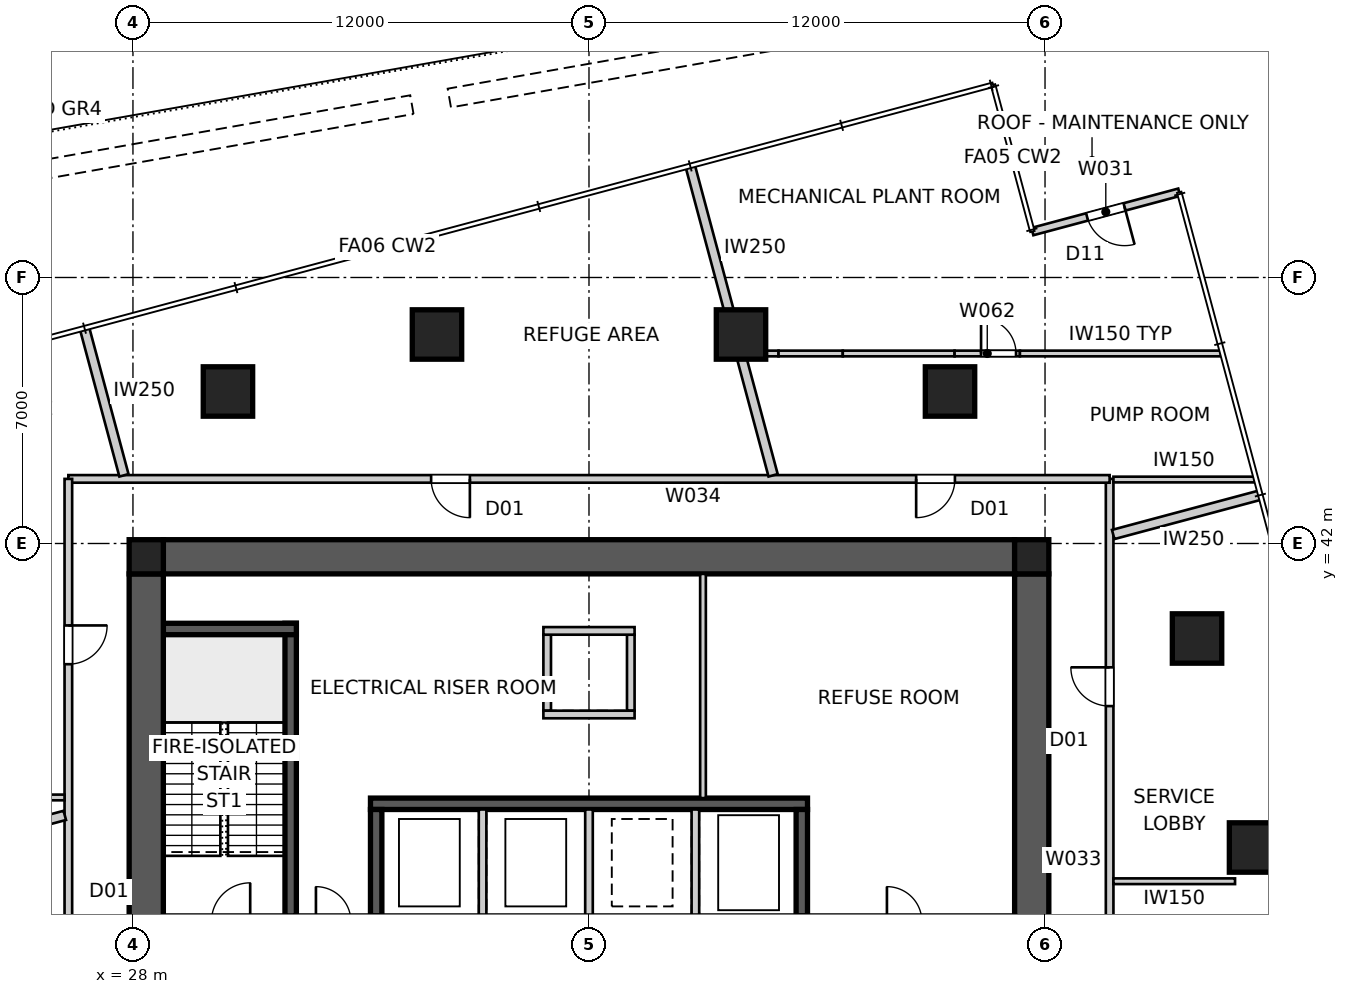
"""IFC4 building model, lengths in metres.
Left out: names, types, materials, properties, quantities, classifications, styles, units other than length and angle.
Written with IfcOpenShell. Run it as: python <this file> out.ifc"""

import sys

from ifc_helpers import new_model, si_unit, direction, frame, frame_2d, origin, origin_2d, place, context, subcontext, project, spatial, polyline, rectangle, outline, extrude, element, fill, save


model = new_model("IFC4")
c1 = context("Model", 3, precision=1e-05, world=origin(), true_north=direction((0.0, 1.0)))
c2 = subcontext(c1, "Body", "Model", "MODEL_VIEW")
j1 = project(units=[si_unit("LENGTHUNIT", "METRE"), si_unit("PLANEANGLEUNIT", "RADIAN")], contexts=[c1])
p1 = place(None, origin())
s1 = spatial("IfcSite", under=j1, at=p1, CompositionType="ELEMENT")
p2 = place(p1, origin())
s2 = spatial("IfcBuilding", under=s1, at=p2, CompositionType="ELEMENT")
p3 = place(p2, frame((0.0, 0.0, 106.6)))
s3 = spatial("IfcBuildingStorey", under=s2, at=p3, CompositionType="ELEMENT", Elevation=106.6)
p4 = place(p3, frame((28.8, 41.65, 0.0), z_axis=(0.0, 0.0, 1.0), x_axis=(1.0, 0.0, 0.0)))
e1 = element("IfcWall", 1, at=p4, inside=s3, PredefinedType="SHEAR", context=c2, shape_type="SweptSolid", body=[
    extrude(outline(polyline([(0.0, -0.45), (22.4, -0.45), (22.4, -0.025), (22.85, -0.025), (22.85, 0.025), (22.4, 0.025), (22.4, 0.45), (0.0, 0.45), (0.0, 0.025), (-0.45, 0.025), (-0.45, -0.025), (0.0, -0.025), (0.0, -0.45)])), origin(), (0.0, 0.0, 1.0), 5.0),
])
p5 = place(p3, frame((51.65, 18.8, 0.0), z_axis=(0.0, 0.0, 1.0), x_axis=(0.0, 1.0, 0.0)))
e2 = element("IfcWall", 2, at=p5, inside=s3, PredefinedType="SHEAR", context=c2, shape_type="SweptSolid", body=[
    extrude(outline(polyline([(0.0, -0.45), (22.4, -0.45), (22.4, -0.025), (22.85, -0.025), (22.85, 0.025), (22.4, 0.025), (22.4, 0.45), (0.0, 0.45), (0.0, 0.025), (-0.45, 0.025), (-0.45, -0.025), (0.0, -0.025), (0.0, -0.45)])), origin(), (0.0, 0.0, 1.0), 5.0),
])
p6 = place(p5, frame((11.14, 0.0, 0.0)))
e3 = element("IfcOpeningElement", 3, at=p6, cuts=e2, PredefinedType="OPENING", context=c2, shape_type="SweptSolid", body=[
    extrude(rectangle(XDim=1.02, YDim=2.4, at=frame_2d((0.51, 1.2))), frame((0.0, 0.46, 0.0), z_axis=(0.0, -1.0, 0.0), x_axis=(1.0, 0.0, 0.0)), (0.0, 0.0, 1.0), 0.92),
])
p7 = place(p3, frame((28.35, 41.2, 0.0), z_axis=(0.0, 0.0, 1.0), x_axis=(0.0, -1.0, 0.0)))
e4 = element("IfcWall", 4, at=p7, inside=s3, PredefinedType="SHEAR", context=c2, shape_type="SweptSolid", body=[
    extrude(outline(polyline([(0.0, -0.45), (22.4, -0.45), (22.4, -0.025), (22.85, -0.025), (22.85, 0.025), (22.4, 0.025), (22.4, 0.45), (0.0, 0.45), (0.0, 0.025), (-0.45, 0.025), (-0.45, -0.025), (0.0, -0.025), (0.0, -0.45)])), origin(), (0.0, 0.0, 1.0), 5.0),
])
p8 = place(p7, frame((11.14, 0.0, 0.0)))
e5 = element("IfcOpeningElement", 5, at=p8, cuts=e4, PredefinedType="OPENING", context=c2, shape_type="SweptSolid", body=[
    extrude(rectangle(XDim=1.02, YDim=2.4, at=frame_2d((0.51, 1.2))), frame((0.0, 0.46, 0.0), z_axis=(0.0, -1.0, 0.0), x_axis=(1.0, 0.0, 0.0)), (0.0, 0.0, 1.0), 0.92),
])
p9 = place(p3, frame((34.25, 35.15, 0.0), z_axis=(0.0, 0.0, 1.0), x_axis=(1.0, 0.0, 0.0)))
e6 = element("IfcWall", 6, at=p9, inside=s3, PredefinedType="SHEAR", context=c2, shape_type="SweptSolid", body=[
    extrude(rectangle(XDim=11.5, YDim=0.3, at=frame_2d((5.75, 0.0))), origin(), (0.0, 0.0, 1.0), 5.0),
])
p10 = place(p3, frame((34.4, 32.2, 0.0), z_axis=(0.0, 0.0, 1.0), x_axis=(0.0, 1.0, 0.0)))
e7 = element("IfcWall", 7, at=p10, inside=s3, PredefinedType="SHEAR", context=c2, shape_type="SweptSolid", body=[
    extrude(rectangle(XDim=2.8, YDim=0.3, at=frame_2d((1.4, 0.0))), origin(), (0.0, 0.0, 1.0), 5.0),
])
for number, where, z_axis, x_axis in (
    (8, (37.2, 32.2, 0.0), (0.0, 0.0, 1.0), (0.0, 1.0, 0.0)),
    (9, (40.0, 32.2, 0.0), (0.0, 0.0, 1.0), (0.0, 1.0, 0.0)),
    (10, (42.8, 32.2, 0.0), (0.0, 0.0, 1.0), (0.0, 1.0, 0.0)),
):
    element("IfcWall", number, at=place(p3, frame(where, z_axis=z_axis, x_axis=x_axis)), inside=s3, PredefinedType="SOLIDWALL", context=c2, shape_type="SweptSolid", body=[
        extrude(rectangle(XDim=2.8, YDim=0.2, at=frame_2d((1.4, 0.0))), origin(), (0.0, 0.0, 1.0), 5.0),
    ])
p11 = place(p3, frame((45.6, 32.2, 0.0), z_axis=(0.0, 0.0, 1.0), x_axis=(0.0, 1.0, 0.0)))
e11 = element("IfcWall", 11, at=p11, inside=s3, PredefinedType="SHEAR", context=c2, shape_type="SweptSolid", body=[
    extrude(rectangle(XDim=2.8, YDim=0.3, at=frame_2d((1.4, 0.0))), origin(), (0.0, 0.0, 1.0), 5.0),
])
p12 = place(p3, frame((32.15, 32.2, 0.0), z_axis=(0.0, 0.0, 1.0), x_axis=(0.0, 1.0, 0.0)))
e12 = element("IfcWall", 12, at=p12, inside=s3, PredefinedType="SHEAR", context=c2, shape_type="SweptSolid", body=[
    extrude(rectangle(XDim=7.7, YDim=0.3, at=frame_2d((3.85, 0.0))), origin(), (0.0, 0.0, 1.0), 5.0),
])
p13 = place(p3, frame((28.8, 39.75, 0.0), z_axis=(0.0, 0.0, 1.0), x_axis=(1.0, 0.0, 0.0)))
e13 = element("IfcWall", 13, at=p13, inside=s3, PredefinedType="SHEAR", context=c2, shape_type="SweptSolid", body=[
    extrude(rectangle(XDim=3.5, YDim=0.3, at=frame_2d((1.75, 0.0))), origin(), (0.0, 0.0, 1.0), 5.0),
])
for number, where, z_axis, x_axis in (
    (14, (38.9, 37.6, 0.0), (0.0, 0.0, 1.0), (0.0, 1.0, 0.0)),
    (15, (41.1, 37.6, 0.0), (0.0, 0.0, 1.0), (0.0, 1.0, 0.0)),
):
    element("IfcWall", number, at=place(p3, frame(where, z_axis=z_axis, x_axis=x_axis)), inside=s3, PredefinedType="SOLIDWALL", context=c2, shape_type="SweptSolid", body=[
        extrude(rectangle(XDim=2.0, YDim=0.2, at=frame_2d((1.0, 0.0))), origin(), (0.0, 0.0, 1.0), 5.0),
    ])
for number, where, z_axis, x_axis in (
    (16, (38.8, 37.5, 0.0), (0.0, 0.0, 1.0), (1.0, 0.0, 0.0)),
    (17, (38.8, 39.7, 0.0), (0.0, 0.0, 1.0), (1.0, 0.0, 0.0)),
):
    element("IfcWall", number, at=place(p3, frame(where, z_axis=z_axis, x_axis=x_axis)), inside=s3, PredefinedType="SOLIDWALL", context=c2, shape_type="SweptSolid", body=[
        extrude(rectangle(XDim=2.4, YDim=0.2, at=frame_2d((1.2, 0.0))), origin(), (0.0, 0.0, 1.0), 5.0),
    ])
for number, where, z_axis, x_axis in (
    (18, (51.65, 41.65, 0.0), (0.0, 0.0, 1.0), (1.0, 0.0, 0.0)),
    (19, (28.35, 41.65, 0.0), (0.0, 0.0, 1.0), (1.0, 0.0, 0.0)),
):
    element("IfcColumn", number, at=place(p3, frame(where, z_axis=z_axis, x_axis=x_axis)), inside=s3, PredefinedType="COLUMN", context=c2, shape_type="SweptSolid", body=[
        extrude(rectangle(XDim=0.9, YDim=0.9, at=origin_2d()), origin(), (0.0, 0.0, 1.0), 5.0),
    ])
for number, where, z_axis, x_axis in (
    (20, (57.5, 34.0, 0.0), (0.0, 0.0, 1.0), (1.0, 0.0, 0.0)),
    (21, (56.0, 39.5, 0.0), (0.0, 0.0, 1.0), (1.0, 0.0, 0.0)),
    (22, (49.5, 46.0, 0.0), (0.0, 0.0, 1.0), (1.0, 0.0, 0.0)),
    (23, (44.0, 47.5, 0.0), (0.0, 0.0, 1.0), (1.0, 0.0, 0.0)),
    (24, (36.0, 47.5, 0.0), (0.0, 0.0, 1.0), (1.0, 0.0, 0.0)),
    (25, (30.5, 46.0, 0.0), (0.0, 0.0, 1.0), (1.0, 0.0, 0.0)),
):
    element("IfcColumn", number, at=place(p3, frame(where, z_axis=z_axis, x_axis=x_axis)), inside=s3, PredefinedType="COLUMN", context=c2, shape_type="SweptSolid", body=[
        extrude(rectangle(XDim=1.3, YDim=1.3, at=origin_2d()), origin(), (0.0, 0.0, 1.0), 5.0),
    ])
p14 = place(p3, frame((55.531, 51.244, 0.0), z_axis=(0.0, 0.0, 1.0), x_axis=(-0.965919172068, -0.258843877716, 0.0)))
e26 = element("IfcWall", 26, at=p14, inside=s3, PredefinedType="SOLIDWALL", context=c2, shape_type="SweptSolid", body=[
    extrude(rectangle(XDim=4.0, YDim=0.2, at=frame_2d((2.0, 0.0))), origin(), (0.0, 0.0, 1.0), 4.85),
])
p15 = place(p14, frame((1.49, 0.0, 0.0)))
e27 = element("IfcOpeningElement", 27, at=p15, cuts=e26, PredefinedType="OPENING", context=c2, shape_type="SweptSolid", body=[
    extrude(rectangle(XDim=1.02, YDim=2.1, at=frame_2d((0.51, 1.05))), frame((0.0, 0.11, 0.0), z_axis=(0.0, -1.0, 0.0), x_axis=(1.0, 0.0, 0.0)), (0.0, 0.0, 1.0), 0.22),
])
p16 = place(p3, frame((53.7, 16.3, 0.0), z_axis=(0.0, 0.0, 1.0), x_axis=(0.0, 1.0, 0.0)))
e28 = element("IfcWall", 28, at=p16, inside=s3, PredefinedType="PARTITIONING", context=c2, shape_type="SweptSolid", body=[
    extrude(rectangle(XDim=27.4, YDim=0.2, at=frame_2d((13.7, 0.0))), origin(), (0.0, 0.0, 1.0), 4.85),
])
p17 = place(p16, frame((21.421, 0.0, 0.0)))
e29 = element("IfcOpeningElement", 29, at=p17, cuts=e28, PredefinedType="OPENING", context=c2, shape_type="SweptSolid", body=[
    extrude(rectangle(XDim=1.02, YDim=2.34, at=frame_2d((0.51, 1.17))), frame((0.0, 0.11, 0.0), z_axis=(0.0, -1.0, 0.0), x_axis=(1.0, 0.0, 0.0)), (0.0, 0.0, 1.0), 0.22),
])
p18 = place(p16, frame((12.293, 0.0, 0.0)))
e30 = element("IfcOpeningElement", 30, at=p18, cuts=e28, PredefinedType="OPENING", context=c2, shape_type="SweptSolid", body=[
    extrude(rectangle(XDim=1.02, YDim=2.34, at=frame_2d((0.51, 1.17))), frame((0.0, 0.11, 0.0), z_axis=(0.0, -1.0, 0.0), x_axis=(1.0, 0.0, 0.0)), (0.0, 0.0, 1.0), 0.22),
])
p19 = place(p16, frame((4.133, 0.0, 0.0)))
e31 = element("IfcOpeningElement", 31, at=p19, cuts=e28, PredefinedType="OPENING", context=c2, shape_type="SweptSolid", body=[
    extrude(rectangle(XDim=1.02, YDim=2.34, at=frame_2d((0.51, 1.17))), frame((0.0, 0.11, 0.0), z_axis=(0.0, -1.0, 0.0), x_axis=(1.0, 0.0, 0.0)), (0.0, 0.0, 1.0), 0.22),
])
p20 = place(p16, frame((0.862, 0.0, 0.0)))
e32 = element("IfcOpeningElement", 32, at=p20, cuts=e28, PredefinedType="OPENING", context=c2, shape_type="SweptSolid", body=[
    extrude(rectangle(XDim=1.02, YDim=2.34, at=frame_2d((0.51, 1.17))), frame((0.0, 0.11, 0.0), z_axis=(0.0, -1.0, 0.0), x_axis=(1.0, 0.0, 0.0)), (0.0, 0.0, 1.0), 0.22),
])
p21 = place(p16, frame((7.342, 0.0, 0.0)))
e33 = element("IfcOpeningElement", 33, at=p21, cuts=e28, PredefinedType="OPENING", context=c2, shape_type="SweptSolid", body=[
    extrude(rectangle(XDim=1.02, YDim=2.34, at=frame_2d((0.51, 1.17))), frame((0.0, 0.11, 0.0), z_axis=(0.0, -1.0, 0.0), x_axis=(1.0, 0.0, 0.0)), (0.0, 0.0, 1.0), 0.22),
])
p22 = place(p3, frame((53.7, 43.7, 0.0), z_axis=(0.0, 0.0, 1.0), x_axis=(-1.0, 0.0, 0.0)))
e34 = element("IfcWall", 34, at=p22, inside=s3, PredefinedType="PARTITIONING", context=c2, shape_type="SweptSolid", body=[
    extrude(rectangle(XDim=27.4, YDim=0.2, at=frame_2d((13.7, 0.0))), origin(), (0.0, 0.0, 1.0), 4.85),
])
p23 = place(p22, frame((16.834, 0.0, 0.0)))
e35 = element("IfcOpeningElement", 35, at=p23, cuts=e34, PredefinedType="OPENING", context=c2, shape_type="SweptSolid", body=[
    extrude(rectangle(XDim=1.02, YDim=2.34, at=frame_2d((0.51, 1.17))), frame((0.0, 0.11, 0.0), z_axis=(0.0, -1.0, 0.0), x_axis=(1.0, 0.0, 0.0)), (0.0, 0.0, 1.0), 0.22),
])
p24 = place(p22, frame((4.071, 0.0, 0.0)))
e36 = element("IfcOpeningElement", 36, at=p24, cuts=e34, PredefinedType="OPENING", context=c2, shape_type="SweptSolid", body=[
    extrude(rectangle(XDim=1.02, YDim=2.34, at=frame_2d((0.51, 1.17))), frame((0.0, 0.11, 0.0), z_axis=(0.0, -1.0, 0.0), x_axis=(1.0, 0.0, 0.0)), (0.0, 0.0, 1.0), 0.22),
])
p25 = place(p3, frame((26.3, 43.7, 0.0), z_axis=(0.0, 0.0, 1.0), x_axis=(0.0, -1.0, 0.0)))
e37 = element("IfcWall", 37, at=p25, inside=s3, PredefinedType="PARTITIONING", context=c2, shape_type="SweptSolid", body=[
    extrude(rectangle(XDim=27.4, YDim=0.2, at=frame_2d((13.7, 0.0))), origin(), (0.0, 0.0, 1.0), 4.85),
])
p26 = place(p25, frame((20.535, 0.0, 0.0)))
e38 = element("IfcOpeningElement", 38, at=p26, cuts=e37, PredefinedType="OPENING", context=c2, shape_type="SweptSolid", body=[
    extrude(rectangle(XDim=1.02, YDim=2.34, at=frame_2d((0.51, 1.17))), frame((0.0, 0.11, 0.0), z_axis=(0.0, -1.0, 0.0), x_axis=(1.0, 0.0, 0.0)), (0.0, 0.0, 1.0), 0.22),
])
p27 = place(p25, frame((3.856, 0.0, 0.0)))
e39 = element("IfcOpeningElement", 39, at=p27, cuts=e37, PredefinedType="OPENING", context=c2, shape_type="SweptSolid", body=[
    extrude(rectangle(XDim=1.02, YDim=2.34, at=frame_2d((0.51, 1.17))), frame((0.0, 0.11, 0.0), z_axis=(0.0, -1.0, 0.0), x_axis=(1.0, 0.0, 0.0)), (0.0, 0.0, 1.0), 0.22),
])
p28 = place(p25, frame((11.779, 0.0, 0.0)))
e40 = element("IfcOpeningElement", 40, at=p28, cuts=e37, PredefinedType="OPENING", context=c2, shape_type="SweptSolid", body=[
    extrude(rectangle(XDim=1.02, YDim=2.34, at=frame_2d((0.51, 1.17))), frame((0.0, 0.11, 0.0), z_axis=(0.0, -1.0, 0.0), x_axis=(1.0, 0.0, 0.0)), (0.0, 0.0, 1.0), 0.22),
])
p29 = place(p3, frame((57.666, 43.275, 0.0), z_axis=(0.0, 0.0, 1.0), x_axis=(-0.96592902462, -0.258807108475, 0.0)))
e41 = element("IfcWall", 41, at=p29, inside=s3, PredefinedType="PARTITIONING", context=c2, shape_type="SweptSolid", body=[
    extrude(rectangle(XDim=4.009, YDim=0.25, at=frame_2d((2.004, 0.0))), origin(), (0.0, 0.0, 1.0), 4.85),
])
p30 = place(p3, frame((42.663, 51.937, 0.0), z_axis=(0.0, 0.0, 1.0), x_axis=(0.25881425273, -0.965927110389, 0.0)))
e42 = element("IfcWall", 42, at=p30, inside=s3, PredefinedType="PARTITIONING", context=c2, shape_type="SweptSolid", body=[
    extrude(rectangle(XDim=8.43, YDim=0.25, at=frame_2d((4.215, 0.0))), origin(), (0.0, 0.0, 1.0), 4.85),
])
p31 = place(p3, frame((26.725, 47.666, 0.0), z_axis=(0.0, 0.0, 1.0), x_axis=(0.258807108475, -0.96592902462, 0.0)))
e43 = element("IfcWall", 43, at=p31, inside=s3, PredefinedType="PARTITIONING", context=c2, shape_type="SweptSolid", body=[
    extrude(rectangle(XDim=4.009, YDim=0.25, at=frame_2d((2.004, 0.0))), origin(), (0.0, 0.0, 1.0), 4.85),
])
p32 = place(p3, frame((18.063, 32.663, 0.0), z_axis=(0.0, 0.0, 1.0), x_axis=(0.965927110389, 0.25881425273, 0.0)))
e44 = element("IfcWall", 44, at=p32, inside=s3, PredefinedType="PARTITIONING", context=c2, shape_type="SweptSolid", body=[
    extrude(rectangle(XDim=8.43, YDim=0.25, at=frame_2d((4.215, 0.0))), origin(), (0.0, 0.0, 1.0), 4.85),
])
p33 = place(p3, frame((43.0, 41.2, 0.0), z_axis=(0.0, 0.0, 1.0), x_axis=(0.0, -1.0, 0.0)))
e45 = element("IfcWall", 45, at=p33, inside=s3, PredefinedType="SOLIDWALL", context=c2, shape_type="SweptSolid", body=[
    extrude(rectangle(XDim=5.9, YDim=0.15, at=frame_2d((2.95, 0.0))), origin(), (0.0, 0.0, 1.0), 4.85),
])
p34 = place(p3, frame((53.8, 43.683, 0.0), z_axis=(0.0, 0.0, 1.0), x_axis=(1.0, 0.0, 0.0)))
e46 = element("IfcWall", 46, at=p34, inside=s3, PredefinedType="SOLIDWALL", context=c2, shape_type="SweptSolid", body=[
    extrude(rectangle(XDim=3.717, YDim=0.15, at=frame_2d((1.858, 0.0))), origin(), (0.0, 0.0, 1.0), 4.85),
])
p35 = place(p3, frame((57.0, 33.112, 0.0), z_axis=(0.0, 0.0, 1.0), x_axis=(-1.0, 0.0, 0.0)))
e47 = element("IfcWall", 47, at=p35, inside=s3, PredefinedType="SOLIDWALL", context=c2, shape_type="SweptSolid", body=[
    extrude(rectangle(XDim=3.2, YDim=0.15, at=frame_2d((1.6, 0.0))), origin(), (0.0, 0.0, 1.0), 4.85),
])
p36 = place(p3, frame((43.986, 47.0, 0.0), z_axis=(0.0, 0.0, 1.0), x_axis=(1.0, 0.0, 0.0)))
e48 = element("IfcWall", 48, at=p36, inside=s3, PredefinedType="SOLIDWALL", context=c2, shape_type="SweptSolid", body=[
    extrude(rectangle(XDim=1.002, YDim=0.15, at=frame_2d((0.501, 0.0))), origin(), (0.0, 0.0, 1.0), 4.85),
])
p37 = place(p3, frame((44.988, 47.0, 0.0), z_axis=(0.0, 0.0, 1.0), x_axis=(1.0, 0.0, 0.0)))
e49 = element("IfcWall", 49, at=p37, inside=s3, PredefinedType="SOLIDWALL", context=c2, shape_type="SweptSolid", body=[
    extrude(rectangle(XDim=1.69, YDim=0.15, at=frame_2d((0.845, 0.0))), origin(), (0.0, 0.0, 1.0), 3.85),
])
p38 = place(p3, frame((46.678, 47.0, 0.0), z_axis=(0.0, 0.0, 1.0), x_axis=(1.0, 0.0, 0.0)))
e50 = element("IfcWall", 50, at=p38, inside=s3, PredefinedType="SOLIDWALL", context=c2, shape_type="SweptSolid", body=[
    extrude(rectangle(XDim=2.942, YDim=0.15, at=frame_2d((1.471, 0.0))), origin(), (0.0, 0.0, 1.0), 4.85),
])
p39 = place(p3, frame((49.62, 47.0, 0.0), z_axis=(0.0, 0.0, 1.0), x_axis=(1.0, 0.0, 0.0)))
e51 = element("IfcWall", 51, at=p39, inside=s3, PredefinedType="SOLIDWALL", context=c2, shape_type="SweptSolid", body=[
    extrude(rectangle(XDim=1.719, YDim=0.15, at=frame_2d((0.859, 0.0))), origin(), (0.0, 0.0, 1.0), 4.049),
])
p40 = place(p39, frame((0.697, 0.0, 0.0)))
e52 = element("IfcOpeningElement", 52, at=p40, cuts=e51, PredefinedType="OPENING", context=c2, shape_type="SweptSolid", body=[
    extrude(rectangle(XDim=0.92, YDim=2.1, at=frame_2d((0.46, 1.05))), frame((0.0, 0.085, 0.0), z_axis=(0.0, -1.0, 0.0), x_axis=(1.0, 0.0, 0.0)), (0.0, 0.0, 1.0), 0.17),
])
p41 = place(p3, frame((51.339, 47.0, 0.0), z_axis=(0.0, 0.0, 1.0), x_axis=(1.0, 0.0, 0.0)))
e53 = element("IfcWall", 53, at=p41, inside=s3, PredefinedType="SOLIDWALL", context=c2, shape_type="SweptSolid", body=[
    extrude(rectangle(XDim=5.287, YDim=0.15, at=frame_2d((2.644, 0.0))), origin(), (0.0, 0.0, 1.0), 4.85),
])
p42 = place(p3, frame((26.2, 35.317, 0.0), z_axis=(0.0, 0.0, 1.0), x_axis=(-1.0, 0.0, 0.0)))
e54 = element("IfcWall", 54, at=p42, inside=s3, PredefinedType="SOLIDWALL", context=c2, shape_type="SweptSolid", body=[
    extrude(rectangle(XDim=3.2, YDim=0.15, at=frame_2d((1.6, 0.0))), origin(), (0.0, 0.0, 1.0), 4.85),
])
p43 = place(p15, origin())
e55 = element("IfcDoor", 55, at=p43, inside=s3, OperationType="SINGLE_SWING_LEFT", PredefinedType="DOOR", context=c2, shape_type="SweptSolid", body=[
    extrude(rectangle(XDim=1.02, YDim=2.1, at=frame_2d((0.51, 1.05))), frame((0.0, 0.025, 0.0), z_axis=(0.0, -1.0, 0.0), x_axis=(1.0, 0.0, 0.0)), (0.0, 0.0, 1.0), 0.05),
])
fill(e27, e55)
p44 = place(p23, origin())
e56 = element("IfcDoor", 56, at=p44, inside=s3, OperationType="SINGLE_SWING_LEFT", PredefinedType="DOOR", context=c2, shape_type="SweptSolid", body=[
    extrude(rectangle(XDim=1.02, YDim=2.34, at=frame_2d((0.51, 1.17))), frame((0.0, 0.025, 0.0), z_axis=(0.0, -1.0, 0.0), x_axis=(1.0, 0.0, 0.0)), (0.0, 0.0, 1.0), 0.05),
])
fill(e35, e56)
p45 = place(p17, origin())
e57 = element("IfcDoor", 57, at=p45, inside=s3, OperationType="SINGLE_SWING_RIGHT", PredefinedType="DOOR", context=c2, shape_type="SweptSolid", body=[
    extrude(rectangle(XDim=1.02, YDim=2.34, at=frame_2d((0.51, 1.17))), frame((0.0, 0.025, 0.0), z_axis=(0.0, -1.0, 0.0), x_axis=(1.0, 0.0, 0.0)), (0.0, 0.0, 1.0), 0.05),
])
fill(e29, e57)
p46 = place(p24, origin())
e58 = element("IfcDoor", 58, at=p46, inside=s3, OperationType="SINGLE_SWING_RIGHT", PredefinedType="DOOR", context=c2, shape_type="SweptSolid", body=[
    extrude(rectangle(XDim=1.02, YDim=2.34, at=frame_2d((0.51, 1.17))), frame((0.0, 0.025, 0.0), z_axis=(0.0, -1.0, 0.0), x_axis=(1.0, 0.0, 0.0)), (0.0, 0.0, 1.0), 0.05),
])
fill(e36, e58)
p47 = place(p27, origin())
e59 = element("IfcDoor", 59, at=p47, inside=s3, OperationType="SINGLE_SWING_LEFT", PredefinedType="DOOR", context=c2, shape_type="SweptSolid", body=[
    extrude(rectangle(XDim=1.02, YDim=2.34, at=frame_2d((0.51, 1.17))), frame((0.0, 0.025, 0.0), z_axis=(0.0, -1.0, 0.0), x_axis=(1.0, 0.0, 0.0)), (0.0, 0.0, 1.0), 0.05),
])
fill(e39, e59)
p48 = place(p40, origin())
e60 = element("IfcDoor", 60, at=p48, inside=s3, OperationType="SINGLE_SWING_LEFT", PredefinedType="DOOR", context=c2, shape_type="SweptSolid", body=[
    extrude(rectangle(XDim=0.92, YDim=2.1, at=frame_2d((0.46, 1.05))), frame((0.0, 0.025, 0.0), z_axis=(0.0, -1.0, 0.0), x_axis=(1.0, 0.0, 0.0)), (0.0, 0.0, 1.0), 0.05),
])
fill(e52, e60)
save(model, sys.argv[1])
